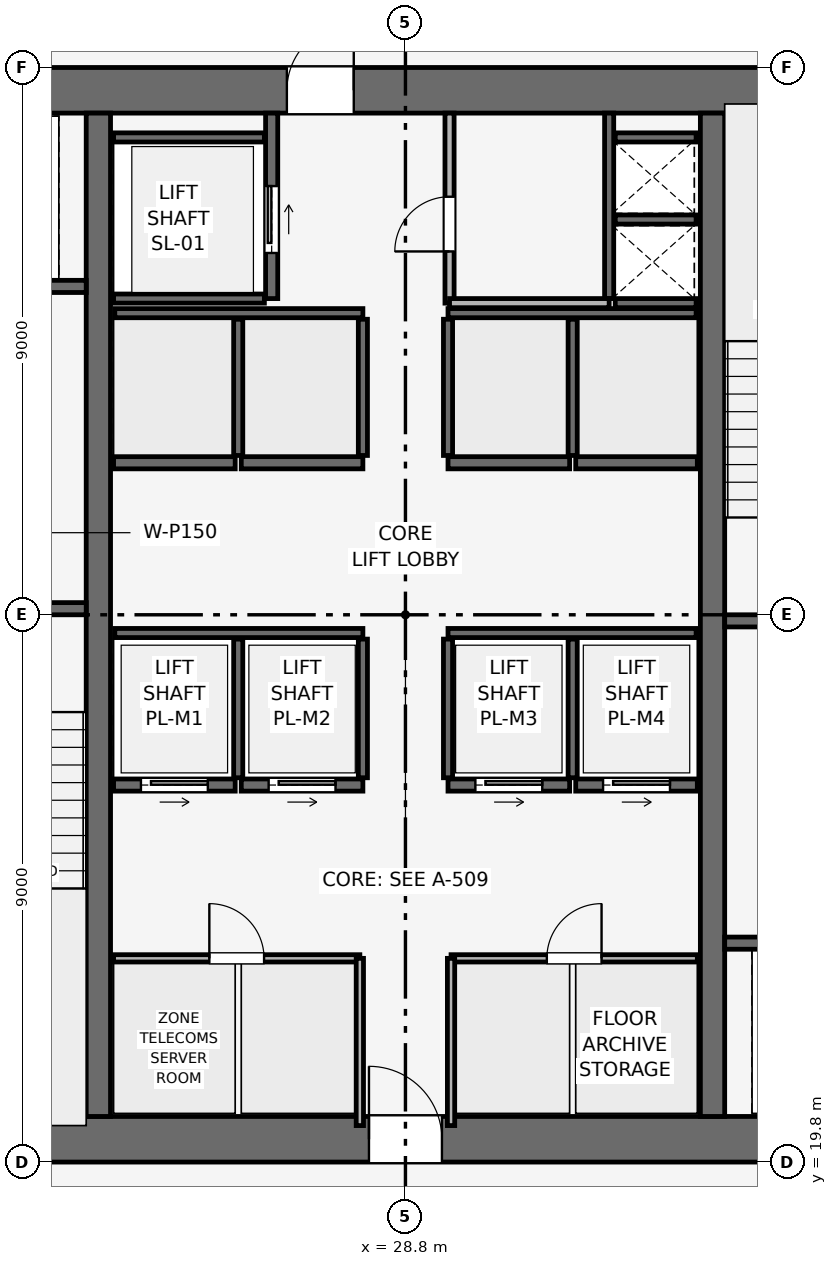
"""IFC4 building model, lengths in metres.
Left out: names, types, materials, properties, quantities, classifications, styles, units other than length and angle.
Written with IfcOpenShell. Run it as: python <this file> out.ifc"""

import sys

from ifc_helpers import new_model, si_unit, direction, frame, frame_2d, origin, place, context, subcontext, project, spatial, rectangle, extrude, element, fill, save


model = new_model("IFC4")
c1 = context("Model", 3, precision=1e-05, world=origin(), true_north=direction((0.0, 1.0)))
c2 = subcontext(c1, "Body", "Model", "MODEL_VIEW")
j1 = project(units=[si_unit("LENGTHUNIT", "METRE"), si_unit("PLANEANGLEUNIT", "RADIAN")], contexts=[c1])
p1 = place(None, origin())
s1 = spatial("IfcSite", under=j1, at=p1, CompositionType="ELEMENT")
p2 = place(p1, origin())
s2 = spatial("IfcBuilding", under=s1, at=p2, CompositionType="ELEMENT")
p3 = place(p2, frame((0.0, 0.0, 237.45)))
s3 = spatial("IfcBuildingStorey", under=s2, at=p3, CompositionType="ELEMENT", Elevation=237.45)
p4 = place(p3, frame((19.8, 20.175, 0.0), z_axis=(0.0, 0.0, 1.0), x_axis=(1.0, 0.0, 0.0)))
e1 = element("IfcWall", 1, at=p4, inside=s3, PredefinedType="SHEAR", context=c2, shape_type="SweptSolid", body=[
    extrude(rectangle(XDim=18.0, YDim=0.75, at=frame_2d((9.0, 0.0))), origin(), (0.0, 0.0, 1.0), 3.75),
])
p5 = place(p4, frame((8.4, 0.0, 0.0)))
e2 = element("IfcOpeningElement", 2, at=p5, cuts=e1, PredefinedType="OPENING", context=c2, shape_type="SweptSolid", body=[
    extrude(rectangle(XDim=1.2, YDim=2.2, at=frame_2d((0.6, 1.1))), frame((0.0, 0.385, 0.0), z_axis=(0.0, -1.0, 0.0), x_axis=(1.0, 0.0, 0.0)), (0.0, 0.0, 1.0), 0.77),
])
p6 = place(p3, frame((19.8, 37.425, 0.0), z_axis=(0.0, 0.0, 1.0), x_axis=(1.0, 0.0, 0.0)))
e3 = element("IfcWall", 3, at=p6, inside=s3, PredefinedType="SHEAR", context=c2, shape_type="SweptSolid", body=[
    extrude(rectangle(XDim=18.0, YDim=0.75, at=frame_2d((9.0, 0.0))), origin(), (0.0, 0.0, 1.0), 3.75),
])
p7 = place(p6, frame((7.05, 0.0, 0.0)))
e4 = element("IfcOpeningElement", 4, at=p7, cuts=e3, PredefinedType="OPENING", context=c2, shape_type="SweptSolid", body=[
    extrude(rectangle(XDim=1.1, YDim=2.15, at=frame_2d((0.55, 1.075))), frame((0.0, 0.385, 0.0), z_axis=(0.0, -1.0, 0.0), x_axis=(1.0, 0.0, 0.0)), (0.0, 0.0, 1.0), 0.77),
])
for number, where, z_axis, x_axis in (
    (5, (23.75, 20.55, 0.0), (0.0, 0.0, 1.0), (0.0, 1.0, 0.0)),
    (6, (33.85, 20.55, 0.0), (0.0, 0.0, 1.0), (0.0, 1.0, 0.0)),
):
    element("IfcWall", number, at=place(p3, frame(where, z_axis=z_axis, x_axis=x_axis)), inside=s3, PredefinedType="SHEAR", context=c2, shape_type="SweptSolid", body=[
        extrude(rectangle(XDim=16.5, YDim=0.4, at=frame_2d((8.25, 0.0))), origin(), (0.0, 0.0, 1.0), 3.75),
    ])
p8 = place(p3, frame((20.4, 28.9, 0.0), z_axis=(0.0, 0.0, 1.0), x_axis=(1.0, 0.0, 0.0)))
e7 = element("IfcWall", 7, at=p8, inside=s3, PredefinedType="SHEAR", context=c2, shape_type="SweptSolid", body=[
    extrude(rectangle(XDim=3.15, YDim=0.2, at=frame_2d((1.575, 0.0))), origin(), (0.0, 0.0, 1.0), 3.5),
])
p9 = place(p8, frame((0.8, 0.0, 0.0)))
e8 = element("IfcOpeningElement", 8, at=p9, cuts=e7, PredefinedType="OPENING", context=c2, shape_type="SweptSolid", body=[
    extrude(rectangle(XDim=1.0, YDim=2.1, at=frame_2d((0.5, 1.05))), frame((0.0, 0.11, 0.0), z_axis=(0.0, -1.0, 0.0), x_axis=(1.0, 0.0, 0.0)), (0.0, 0.0, 1.0), 0.22),
])
p10 = place(p3, frame((34.05, 28.7, 0.0), z_axis=(0.0, 0.0, 1.0), x_axis=(1.0, 0.0, 0.0)))
e9 = element("IfcWall", 9, at=p10, inside=s3, PredefinedType="SHEAR", context=c2, shape_type="SweptSolid", body=[
    extrude(rectangle(XDim=3.15, YDim=0.2, at=frame_2d((1.575, 0.0))), origin(), (0.0, 0.0, 1.0), 3.5),
])
p11 = place(p10, frame((0.8, 0.0, 0.0)))
e10 = element("IfcOpeningElement", 10, at=p11, cuts=e9, PredefinedType="OPENING", context=c2, shape_type="SweptSolid", body=[
    extrude(rectangle(XDim=1.0, YDim=2.1, at=frame_2d((0.5, 1.05))), frame((0.0, 0.11, 0.0), z_axis=(0.0, -1.0, 0.0), x_axis=(1.0, 0.0, 0.0)), (0.0, 0.0, 1.0), 0.22),
])
p12 = place(p3, frame((32.15, 34.0, 0.0), z_axis=(0.0, 0.0, 1.0), x_axis=(0.0, 1.0, 0.0)))
e11 = element("IfcWall", 11, at=p12, inside=s3, PredefinedType="SHEAR", context=c2, shape_type="SweptSolid", body=[
    extrude(rectangle(XDim=3.05, YDim=0.15, at=frame_2d((1.525, 0.0))), origin(), (0.0, 0.0, 1.0), 3.5),
])
for number, where, z_axis, x_axis in (
    (12, (32.25, 33.925, 0.0), (0.0, 0.0, 1.0), (1.0, 0.0, 0.0)),
    (13, (32.25, 35.3, 0.0), (0.0, 0.0, 1.0), (1.0, 0.0, 0.0)),
):
    element("IfcWall", number, at=place(p3, frame(where, z_axis=z_axis, x_axis=x_axis)), inside=s3, PredefinedType="SHEAR", context=c2, shape_type="SweptSolid", body=[
        extrude(rectangle(XDim=1.33, YDim=0.15, at=frame_2d((0.665, 0.0))), origin(), (0.0, 0.0, 1.0), 3.5),
    ])
p13 = place(p3, frame((20.5, 34.2, 0.0), z_axis=(0.0, 0.0, 1.0), x_axis=(1.0, 0.0, 0.0)))
e14 = element("IfcWall", 14, at=p13, inside=s3, PredefinedType="SHEAR", context=c2, shape_type="SweptSolid", body=[
    extrude(rectangle(XDim=3.05, YDim=0.2, at=frame_2d((1.525, 0.0))), origin(), (0.0, 0.0, 1.0), 3.5),
])
p14 = place(p13, frame((0.75, 0.0, 0.0)))
e15 = element("IfcOpeningElement", 15, at=p14, cuts=e14, PredefinedType="OPENING", context=c2, shape_type="SweptSolid", body=[
    extrude(rectangle(XDim=1.1, YDim=2.15, at=frame_2d((0.55, 1.075))), frame((0.0, 0.11, 0.0), z_axis=(0.0, -1.0, 0.0), x_axis=(1.0, 0.0, 0.0)), (0.0, 0.0, 1.0), 0.22),
])
p15 = place(p3, frame((34.05, 23.4, 0.0), z_axis=(0.0, 0.0, 1.0), x_axis=(1.0, 0.0, 0.0)))
e16 = element("IfcWall", 16, at=p15, inside=s3, PredefinedType="SHEAR", context=c2, shape_type="SweptSolid", body=[
    extrude(rectangle(XDim=3.05, YDim=0.2, at=frame_2d((1.525, 0.0))), origin(), (0.0, 0.0, 1.0), 3.5),
])
p16 = place(p15, frame((1.2, 0.0, 0.0)))
e17 = element("IfcOpeningElement", 17, at=p16, cuts=e16, PredefinedType="OPENING", context=c2, shape_type="SweptSolid", body=[
    extrude(rectangle(XDim=1.1, YDim=2.15, at=frame_2d((0.55, 1.075))), frame((0.0, 0.11, 0.0), z_axis=(0.0, -1.0, 0.0), x_axis=(1.0, 0.0, 0.0)), (0.0, 0.0, 1.0), 0.22),
])
p17 = place(p3, frame((26.6, 34.0, 0.0), z_axis=(0.0, 0.0, 1.0), x_axis=(0.0, 1.0, 0.0)))
e18 = element("IfcWall", 18, at=p17, inside=s3, PredefinedType="SHEAR", context=c2, shape_type="SweptSolid", body=[
    extrude(rectangle(XDim=3.05, YDim=0.2, at=frame_2d((1.525, 0.0))), origin(), (0.0, 0.0, 1.0), 3.5),
])
p18 = place(p17, frame((0.75, 0.0, 0.0)))
e19 = element("IfcOpeningElement", 19, at=p18, cuts=e18, PredefinedType="OPENING", context=c2, shape_type="SweptSolid", body=[
    extrude(rectangle(XDim=1.1, YDim=2.15, at=frame_2d((0.55, 1.075))), frame((0.0, 0.11, 0.0), z_axis=(0.0, -1.0, 0.0), x_axis=(1.0, 0.0, 0.0)), (0.0, 0.0, 1.0), 0.22),
])
for number, where, z_axis, x_axis in (
    (20, (24.0, 34.0, 0.0), (0.0, 0.0, 1.0), (1.0, 0.0, 0.0)),
    (21, (24.0, 36.65, 0.0), (0.0, 0.0, 1.0), (1.0, 0.0, 0.0)),
):
    element("IfcWall", number, at=place(p3, frame(where, z_axis=z_axis, x_axis=x_axis)), inside=s3, PredefinedType="SHEAR", context=c2, shape_type="SweptSolid", body=[
        extrude(rectangle(XDim=2.48, YDim=0.15, at=frame_2d((1.24, 0.0))), origin(), (0.0, 0.0, 1.0), 3.5),
    ])
p19 = place(p3, frame((24.0, 26.0, 0.0), z_axis=(0.0, 0.0, 1.0), x_axis=(1.0, 0.0, 0.0)))
e22 = element("IfcWall", 22, at=p19, inside=s3, PredefinedType="SHEAR", context=c2, shape_type="SweptSolid", body=[
    extrude(rectangle(XDim=2.0, YDim=0.2, at=frame_2d((1.0, 0.0))), origin(), (0.0, 0.0, 1.0), 3.5),
])
p20 = place(p19, frame((0.45, 0.0, 0.0)))
e23 = element("IfcOpeningElement", 23, at=p20, cuts=e22, PredefinedType="OPENING", context=c2, shape_type="SweptSolid", body=[
    extrude(rectangle(XDim=1.1, YDim=2.15, at=frame_2d((0.55, 1.075))), frame((0.0, 0.11, 0.0), z_axis=(0.0, -1.0, 0.0), x_axis=(1.0, 0.0, 0.0)), (0.0, 0.0, 1.0), 0.22),
])
p21 = place(p3, frame((26.1, 26.0, 0.0), z_axis=(0.0, 0.0, 1.0), x_axis=(1.0, 0.0, 0.0)))
e24 = element("IfcWall", 24, at=p21, inside=s3, PredefinedType="SHEAR", context=c2, shape_type="SweptSolid", body=[
    extrude(rectangle(XDim=2.0, YDim=0.2, at=frame_2d((1.0, 0.0))), origin(), (0.0, 0.0, 1.0), 3.5),
])
p22 = place(p21, frame((0.45, 0.0, 0.0)))
e25 = element("IfcOpeningElement", 25, at=p22, cuts=e24, PredefinedType="OPENING", context=c2, shape_type="SweptSolid", body=[
    extrude(rectangle(XDim=1.1, YDim=2.15, at=frame_2d((0.55, 1.075))), frame((0.0, 0.11, 0.0), z_axis=(0.0, -1.0, 0.0), x_axis=(1.0, 0.0, 0.0)), (0.0, 0.0, 1.0), 0.22),
])
p23 = place(p3, frame((29.5, 26.0, 0.0), z_axis=(0.0, 0.0, 1.0), x_axis=(1.0, 0.0, 0.0)))
e26 = element("IfcWall", 26, at=p23, inside=s3, PredefinedType="SHEAR", context=c2, shape_type="SweptSolid", body=[
    extrude(rectangle(XDim=2.0, YDim=0.2, at=frame_2d((1.0, 0.0))), origin(), (0.0, 0.0, 1.0), 3.5),
])
p24 = place(p23, frame((0.45, 0.0, 0.0)))
e27 = element("IfcOpeningElement", 27, at=p24, cuts=e26, PredefinedType="OPENING", context=c2, shape_type="SweptSolid", body=[
    extrude(rectangle(XDim=1.1, YDim=2.15, at=frame_2d((0.55, 1.075))), frame((0.0, 0.11, 0.0), z_axis=(0.0, -1.0, 0.0), x_axis=(1.0, 0.0, 0.0)), (0.0, 0.0, 1.0), 0.22),
])
p25 = place(p3, frame((31.6, 26.0, 0.0), z_axis=(0.0, 0.0, 1.0), x_axis=(1.0, 0.0, 0.0)))
e28 = element("IfcWall", 28, at=p25, inside=s3, PredefinedType="SHEAR", context=c2, shape_type="SweptSolid", body=[
    extrude(rectangle(XDim=2.0, YDim=0.2, at=frame_2d((1.0, 0.0))), origin(), (0.0, 0.0, 1.0), 3.5),
])
p26 = place(p25, frame((0.45, 0.0, 0.0)))
e29 = element("IfcOpeningElement", 29, at=p26, cuts=e28, PredefinedType="OPENING", context=c2, shape_type="SweptSolid", body=[
    extrude(rectangle(XDim=1.1, YDim=2.15, at=frame_2d((0.55, 1.075))), frame((0.0, 0.11, 0.0), z_axis=(0.0, -1.0, 0.0), x_axis=(1.0, 0.0, 0.0)), (0.0, 0.0, 1.0), 0.22),
])
for number, where, z_axis, x_axis in (
    (30, (24.0, 31.3, 0.0), (0.0, 0.0, 1.0), (1.0, 0.0, 0.0)),
    (31, (26.1, 31.3, 0.0), (0.0, 0.0, 1.0), (1.0, 0.0, 0.0)),
    (32, (29.5, 31.3, 0.0), (0.0, 0.0, 1.0), (1.0, 0.0, 0.0)),
    (33, (31.6, 31.3, 0.0), (0.0, 0.0, 1.0), (1.0, 0.0, 0.0)),
):
    element("IfcWall", number, at=place(p3, frame(where, z_axis=z_axis, x_axis=x_axis)), inside=s3, PredefinedType="SHEAR", context=c2, shape_type="SweptSolid", body=[
        extrude(rectangle(XDim=2.0, YDim=0.2, at=frame_2d((1.0, 0.0))), origin(), (0.0, 0.0, 1.0), 3.5),
    ])
p27 = place(p3, frame((32.25, 36.65, 0.0), z_axis=(0.0, 0.0, 1.0), x_axis=(1.0, 0.0, 0.0)))
e34 = element("IfcWall", 34, at=p27, inside=s3, PredefinedType="SHEAR", context=c2, shape_type="SweptSolid", body=[
    extrude(rectangle(XDim=1.33, YDim=0.15, at=frame_2d((0.665, 0.0))), origin(), (0.0, 0.0, 1.0), 3.5),
])
for number, where, z_axis, x_axis in (
    (35, (24.02, 28.5, 0.0), (0.0, 0.0, 1.0), (1.0, 0.0, 0.0)),
    (36, (29.5, 28.5, 0.0), (0.0, 0.0, 1.0), (1.0, 0.0, 0.0)),
):
    element("IfcWall", number, at=place(p3, frame(where, z_axis=z_axis, x_axis=x_axis)), inside=s3, PredefinedType="SHEAR", context=c2, shape_type="SweptSolid", body=[
        extrude(rectangle(XDim=4.08, YDim=0.15, at=frame_2d((2.04, 0.0))), origin(), (0.0, 0.0, 1.0), 3.5),
    ])
for number, where, z_axis, x_axis in (
    (37, (26.05, 26.12, 0.0), (0.0, 0.0, 1.0), (0.0, 1.0, 0.0)),
    (38, (28.1, 26.12, 0.0), (0.0, 0.0, 1.0), (0.0, 1.0, 0.0)),
    (39, (29.5, 26.12, 0.0), (0.0, 0.0, 1.0), (0.0, 1.0, 0.0)),
    (40, (31.55, 26.12, 0.0), (0.0, 0.0, 1.0), (0.0, 1.0, 0.0)),
):
    element("IfcWall", number, at=place(p3, frame(where, z_axis=z_axis, x_axis=x_axis)), inside=s3, PredefinedType="SHEAR", context=c2, shape_type="SweptSolid", body=[
        extrude(rectangle(XDim=2.28, YDim=0.15, at=frame_2d((1.14, 0.0))), origin(), (0.0, 0.0, 1.0), 3.5),
    ])
for number, where, z_axis, x_axis in (
    (41, (24.02, 33.76, 0.0), (0.0, 0.0, 1.0), (1.0, 0.0, 0.0)),
    (42, (29.5, 33.76, 0.0), (0.0, 0.0, 1.0), (1.0, 0.0, 0.0)),
):
    element("IfcWall", number, at=place(p3, frame(where, z_axis=z_axis, x_axis=x_axis)), inside=s3, PredefinedType="SHEAR", context=c2, shape_type="SweptSolid", body=[
        extrude(rectangle(XDim=4.08, YDim=0.15, at=frame_2d((2.04, 0.0))), origin(), (0.0, 0.0, 1.0), 3.5),
    ])
for number, where, z_axis, x_axis in (
    (43, (26.05, 31.42, 0.0), (0.0, 0.0, 1.0), (0.0, 1.0, 0.0)),
    (44, (28.1, 31.42, 0.0), (0.0, 0.0, 1.0), (0.0, 1.0, 0.0)),
    (45, (29.5, 31.42, 0.0), (0.0, 0.0, 1.0), (0.0, 1.0, 0.0)),
    (46, (31.55, 31.42, 0.0), (0.0, 0.0, 1.0), (0.0, 1.0, 0.0)),
):
    element("IfcWall", number, at=place(p3, frame(where, z_axis=z_axis, x_axis=x_axis)), inside=s3, PredefinedType="SHEAR", context=c2, shape_type="SweptSolid", body=[
        extrude(rectangle(XDim=2.24, YDim=0.15, at=frame_2d((1.12, 0.0))), origin(), (0.0, 0.0, 1.0), 3.5),
    ])
p28 = place(p3, frame((29.525, 33.925, 0.0), z_axis=(0.0, 0.0, 1.0), x_axis=(0.0, 1.0, 0.0)))
e47 = element("IfcWall", 47, at=p28, inside=s3, PredefinedType="PARTITIONING", context=c2, shape_type="SweptSolid", body=[
    extrude(rectangle(XDim=3.125, YDim=0.15, at=frame_2d((1.562, 0.0))), origin(), (0.0, 0.0, 1.0), 3.5),
])
p29 = place(p28, frame((0.85, 0.0, 0.0)))
e48 = element("IfcOpeningElement", 48, at=p29, cuts=e47, PredefinedType="OPENING", context=c2, shape_type="SweptSolid", body=[
    extrude(rectangle(XDim=0.9, YDim=2.1, at=frame_2d((0.45, 1.05))), frame((0.0, 0.085, 0.0), z_axis=(0.0, -1.0, 0.0), x_axis=(1.0, 0.0, 0.0)), (0.0, 0.0, 1.0), 0.17),
])
p30 = place(p3, frame((29.525, 33.925, 0.0), z_axis=(0.0, 0.0, 1.0), x_axis=(1.0, 0.0, 0.0)))
e49 = element("IfcWall", 49, at=p30, inside=s3, PredefinedType="PARTITIONING", context=c2, shape_type="SweptSolid", body=[
    extrude(rectangle(XDim=2.625, YDim=0.15, at=frame_2d((1.312, 0.0))), origin(), (0.0, 0.0, 1.0), 3.5),
])
p31 = place(p3, frame((24.0, 23.15, 0.0), z_axis=(0.0, 0.0, 1.0), x_axis=(1.0, 0.0, 0.0)))
e50 = element("IfcWall", 50, at=p31, inside=s3, PredefinedType="PARTITIONING", context=c2, shape_type="SweptSolid", body=[
    extrude(rectangle(XDim=4.05, YDim=0.12, at=frame_2d((2.025, 0.0))), origin(), (0.0, 0.0, 1.0), 3.5),
])
p32 = place(p31, frame((1.575, 0.0, 0.0)))
e51 = element("IfcOpeningElement", 51, at=p32, cuts=e50, PredefinedType="OPENING", context=c2, shape_type="SweptSolid", body=[
    extrude(rectangle(XDim=0.9, YDim=2.1, at=frame_2d((0.45, 1.05))), frame((0.0, 0.07, 0.0), z_axis=(0.0, -1.0, 0.0), x_axis=(1.0, 0.0, 0.0)), (0.0, 0.0, 1.0), 0.14),
])
p33 = place(p3, frame((28.05, 20.4, 0.0), z_axis=(0.0, 0.0, 1.0), x_axis=(0.0, 1.0, 0.0)))
e52 = element("IfcWall", 52, at=p33, inside=s3, PredefinedType="PARTITIONING", context=c2, shape_type="SweptSolid", body=[
    extrude(rectangle(XDim=2.75, YDim=0.12, at=frame_2d((1.375, 0.0))), origin(), (0.0, 0.0, 1.0), 3.5),
])
p34 = place(p3, frame((29.55, 23.15, 0.0), z_axis=(0.0, 0.0, 1.0), x_axis=(1.0, 0.0, 0.0)))
e53 = element("IfcWall", 53, at=p34, inside=s3, PredefinedType="PARTITIONING", context=c2, shape_type="SweptSolid", body=[
    extrude(rectangle(XDim=4.05, YDim=0.12, at=frame_2d((2.025, 0.0))), origin(), (0.0, 0.0, 1.0), 3.5),
])
p35 = place(p34, frame((1.575, 0.0, 0.0)))
e54 = element("IfcOpeningElement", 54, at=p35, cuts=e53, PredefinedType="OPENING", context=c2, shape_type="SweptSolid", body=[
    extrude(rectangle(XDim=0.9, YDim=2.1, at=frame_2d((0.45, 1.05))), frame((0.0, 0.07, 0.0), z_axis=(0.0, -1.0, 0.0), x_axis=(1.0, 0.0, 0.0)), (0.0, 0.0, 1.0), 0.14),
])
p36 = place(p3, frame((29.55, 20.4, 0.0), z_axis=(0.0, 0.0, 1.0), x_axis=(0.0, 1.0, 0.0)))
e55 = element("IfcWall", 55, at=p36, inside=s3, PredefinedType="PARTITIONING", context=c2, shape_type="SweptSolid", body=[
    extrude(rectangle(XDim=2.75, YDim=0.12, at=frame_2d((1.375, 0.0))), origin(), (0.0, 0.0, 1.0), 3.5),
])
p37 = place(p18, origin())
e56 = element("IfcDoor", 56, at=p37, inside=s3, OperationType="SLIDING_TO_RIGHT", PredefinedType="DOOR", context=c2, shape_type="SweptSolid", body=[
    extrude(rectangle(XDim=1.1, YDim=2.15, at=frame_2d((0.55, 1.075))), frame((0.0, 0.025, 0.0), z_axis=(0.0, -1.0, 0.0), x_axis=(1.0, 0.0, 0.0)), (0.0, 0.0, 1.0), 0.05),
])
fill(e19, e56)
p38 = place(p20, origin())
e57 = element("IfcDoor", 57, at=p38, inside=s3, OperationType="SLIDING_TO_RIGHT", PredefinedType="DOOR", context=c2, shape_type="SweptSolid", body=[
    extrude(rectangle(XDim=1.1, YDim=2.15, at=frame_2d((0.55, 1.075))), frame((0.0, 0.025, 0.0), z_axis=(0.0, -1.0, 0.0), x_axis=(1.0, 0.0, 0.0)), (0.0, 0.0, 1.0), 0.05),
])
fill(e23, e57)
p39 = place(p22, origin())
e58 = element("IfcDoor", 58, at=p39, inside=s3, OperationType="SLIDING_TO_RIGHT", PredefinedType="DOOR", context=c2, shape_type="SweptSolid", body=[
    extrude(rectangle(XDim=1.1, YDim=2.15, at=frame_2d((0.55, 1.075))), frame((0.0, 0.025, 0.0), z_axis=(0.0, -1.0, 0.0), x_axis=(1.0, 0.0, 0.0)), (0.0, 0.0, 1.0), 0.05),
])
fill(e25, e58)
p40 = place(p24, origin())
e59 = element("IfcDoor", 59, at=p40, inside=s3, OperationType="SLIDING_TO_RIGHT", PredefinedType="DOOR", context=c2, shape_type="SweptSolid", body=[
    extrude(rectangle(XDim=1.1, YDim=2.15, at=frame_2d((0.55, 1.075))), frame((0.0, 0.025, 0.0), z_axis=(0.0, -1.0, 0.0), x_axis=(1.0, 0.0, 0.0)), (0.0, 0.0, 1.0), 0.05),
])
fill(e27, e59)
p41 = place(p26, origin())
e60 = element("IfcDoor", 60, at=p41, inside=s3, OperationType="SLIDING_TO_RIGHT", PredefinedType="DOOR", context=c2, shape_type="SweptSolid", body=[
    extrude(rectangle(XDim=1.1, YDim=2.15, at=frame_2d((0.55, 1.075))), frame((0.0, 0.025, 0.0), z_axis=(0.0, -1.0, 0.0), x_axis=(1.0, 0.0, 0.0)), (0.0, 0.0, 1.0), 0.05),
])
fill(e29, e60)
p42 = place(p29, origin())
e61 = element("IfcDoor", 61, at=p42, inside=s3, OperationType="SINGLE_SWING_LEFT", PredefinedType="DOOR", context=c2, shape_type="SweptSolid", body=[
    extrude(rectangle(XDim=0.9, YDim=2.1, at=frame_2d((0.45, 1.05))), frame((0.0, 0.025, 0.0), z_axis=(0.0, -1.0, 0.0), x_axis=(1.0, 0.0, 0.0)), (0.0, 0.0, 1.0), 0.05),
])
fill(e48, e61)
p43 = place(p32, origin())
e62 = element("IfcDoor", 62, at=p43, inside=s3, OperationType="SINGLE_SWING_LEFT", PredefinedType="DOOR", context=c2, shape_type="SweptSolid", body=[
    extrude(rectangle(XDim=0.9, YDim=2.1, at=frame_2d((0.45, 1.05))), frame((0.0, 0.025, 0.0), z_axis=(0.0, -1.0, 0.0), x_axis=(1.0, 0.0, 0.0)), (0.0, 0.0, 1.0), 0.05),
])
fill(e51, e62)
p44 = place(p35, origin())
e63 = element("IfcDoor", 63, at=p44, inside=s3, OperationType="SINGLE_SWING_RIGHT", PredefinedType="DOOR", context=c2, shape_type="SweptSolid", body=[
    extrude(rectangle(XDim=0.9, YDim=2.1, at=frame_2d((0.45, 1.05))), frame((0.0, 0.025, 0.0), z_axis=(0.0, -1.0, 0.0), x_axis=(1.0, 0.0, 0.0)), (0.0, 0.0, 1.0), 0.05),
])
fill(e54, e63)
p45 = place(p5, origin())
e64 = element("IfcDoor", 64, at=p45, inside=s3, OperationType="SINGLE_SWING_LEFT", PredefinedType="DOOR", context=c2, shape_type="SweptSolid", body=[
    extrude(rectangle(XDim=1.2, YDim=2.2, at=frame_2d((0.6, 1.1))), frame((0.0, 0.025, 0.0), z_axis=(0.0, -1.0, 0.0), x_axis=(1.0, 0.0, 0.0)), (0.0, 0.0, 1.0), 0.05),
])
fill(e2, e64)
p46 = place(p7, origin())
e65 = element("IfcDoor", 65, at=p46, inside=s3, OperationType="SINGLE_SWING_RIGHT", PredefinedType="DOOR", context=c2, shape_type="SweptSolid", body=[
    extrude(rectangle(XDim=1.1, YDim=2.15, at=frame_2d((0.55, 1.075))), frame((0.0, 0.025, 0.0), z_axis=(0.0, -1.0, 0.0), x_axis=(1.0, 0.0, 0.0)), (0.0, 0.0, 1.0), 0.05),
])
fill(e4, e65)
save(model, sys.argv[1])
